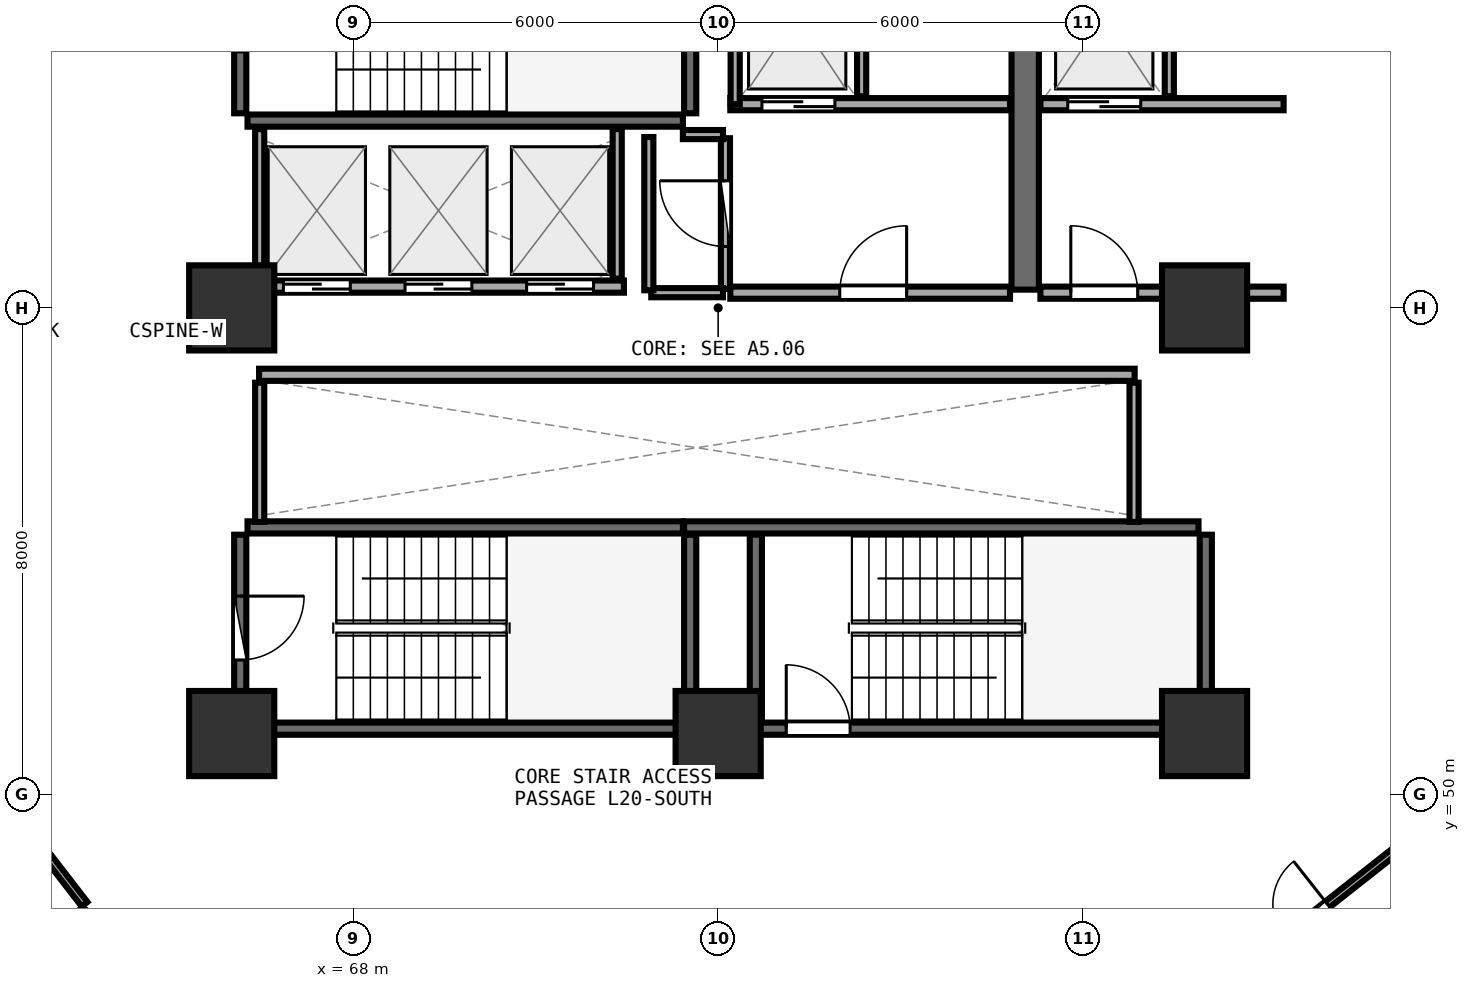
"""IFC4 building model, lengths in metres.
Left out: names, types, materials, properties, quantities, classifications, styles, units other than length and angle.
Written with IfcOpenShell. Run it as: python <this file> out.ifc"""

import sys

from ifc_helpers import new_model, si_unit, direction, frame, frame_2d, origin, origin_2d, place, context, subcontext, project, spatial, rectangle, extrude, element, fill, save


model = new_model("IFC4")
c1 = context("Model", 3, precision=1e-05, world=origin(), true_north=direction((0.0, 1.0)))
c2 = subcontext(c1, "Body", "Model", "MODEL_VIEW")
j1 = project(units=[si_unit("LENGTHUNIT", "METRE"), si_unit("PLANEANGLEUNIT", "RADIAN")], contexts=[c1])
p1 = place(None, origin())
s1 = spatial("IfcSite", under=j1, at=p1, CompositionType="ELEMENT")
p2 = place(p1, origin())
s2 = spatial("IfcBuilding", under=s1, at=p2, CompositionType="ELEMENT")
p3 = place(p2, frame((0.0, 0.0, 80.1)))
s3 = spatial("IfcBuildingStorey", under=s2, at=p3, CompositionType="ELEMENT", Elevation=80.1)
for number, where, z_axis, x_axis in (
    (1, (66.0, 51.0, 0.0), (0.0, 0.0, 1.0), (1.0, 0.0, 0.0)),
    (2, (74.0, 51.0, 0.0), (0.0, 0.0, 1.0), (1.0, 0.0, 0.0)),
    (3, (82.0, 51.0, 0.0), (0.0, 0.0, 1.0), (1.0, 0.0, 0.0)),
    (4, (82.0, 58.0, 0.0), (0.0, 0.0, 1.0), (1.0, 0.0, 0.0)),
    (5, (66.0, 58.0, 0.0), (0.0, 0.0, 1.0), (1.0, 0.0, 0.0)),
):
    element("IfcColumn", number, at=place(p3, frame(where, z_axis=z_axis, x_axis=x_axis)), inside=s3, PredefinedType="PILASTER", context=c2, shape_type="SweptSolid", body=[
        extrude(rectangle(XDim=1.4, YDim=1.4, at=origin_2d()), origin(), (0.0, 0.0, 1.0), 3.75),
    ])
p4 = place(p3, frame((66.26, 61.08, 0.0), z_axis=(0.0, 0.0, 1.0), x_axis=(1.0, 0.0, 0.0)))
e6 = element("IfcWall", 6, at=p4, inside=s3, PredefinedType="SHEAR", context=c2, shape_type="SweptSolid", body=[
    extrude(rectangle(XDim=7.16, YDim=0.2, at=frame_2d((3.58, 0.0))), origin(), (0.0, 0.0, 1.0), 3.49),
])
p5 = place(p3, frame((73.54, 61.2, 0.0), z_axis=(0.0, 0.0, 1.0), x_axis=(0.0, 1.0, 0.0)))
e7 = element("IfcWall", 7, at=p5, inside=s3, PredefinedType="SHEAR", context=c2, shape_type="SweptSolid", body=[
    extrude(rectangle(XDim=3.07, YDim=0.2, at=frame_2d((1.535, 0.0))), origin(), (0.0, 0.0, 1.0), 3.49),
])
p6 = place(p3, frame((66.14, 64.27, 0.0), z_axis=(0.0, 0.0, 1.0), x_axis=(0.0, -1.0, 0.0)))
e8 = element("IfcWall", 8, at=p6, inside=s3, PredefinedType="SHEAR", context=c2, shape_type="SweptSolid", body=[
    extrude(rectangle(XDim=3.07, YDim=0.2, at=frame_2d((1.535, 0.0))), origin(), (0.0, 0.0, 1.0), 3.49),
])
p7 = place(p6, frame((1.01, 0.0, 0.0)))
e9 = element("IfcOpeningElement", 9, at=p7, cuts=e8, PredefinedType="OPENING", context=c2, shape_type="SweptSolid", body=[
    extrude(rectangle(XDim=1.05, YDim=2.1, at=frame_2d((0.525, 1.05))), frame((0.0, 0.11, 0.0), z_axis=(0.0, -1.0, 0.0), x_axis=(1.0, 0.0, 0.0)), (0.0, 0.0, 1.0), 0.22),
])
p8 = place(p3, frame((74.0, 51.08, 0.0), z_axis=(0.0, 0.0, 1.0), x_axis=(1.0, 0.0, 0.0)))
e10 = element("IfcWall", 10, at=p8, inside=s3, PredefinedType="SHEAR", context=c2, shape_type="SweptSolid", body=[
    extrude(rectangle(XDim=7.9, YDim=0.2, at=frame_2d((3.95, 0.0))), origin(), (0.0, 0.0, 1.0), 3.49),
])
p9 = place(p8, frame((1.12, 0.0, 0.0)))
e11 = element("IfcOpeningElement", 11, at=p9, cuts=e10, PredefinedType="OPENING", context=c2, shape_type="SweptSolid", body=[
    extrude(rectangle(XDim=1.05, YDim=2.1, at=frame_2d((0.525, 1.05))), frame((0.0, 0.11, 0.0), z_axis=(0.0, -1.0, 0.0), x_axis=(1.0, 0.0, 0.0)), (0.0, 0.0, 1.0), 0.22),
])
p10 = place(p3, frame((82.02, 51.2, 0.0), z_axis=(0.0, 0.0, 1.0), x_axis=(0.0, 1.0, 0.0)))
e12 = element("IfcWall", 12, at=p10, inside=s3, PredefinedType="SHEAR", context=c2, shape_type="SweptSolid", body=[
    extrude(rectangle(XDim=3.07, YDim=0.2, at=frame_2d((1.535, 0.0))), origin(), (0.0, 0.0, 1.0), 3.49),
])
p11 = place(p3, frame((81.9, 54.39, 0.0), z_axis=(0.0, 0.0, 1.0), x_axis=(-1.0, 0.0, 0.0)))
e13 = element("IfcWall", 13, at=p11, inside=s3, PredefinedType="SHEAR", context=c2, shape_type="SweptSolid", body=[
    extrude(rectangle(XDim=8.46, YDim=0.2, at=frame_2d((4.23, 0.0))), origin(), (0.0, 0.0, 1.0), 3.49),
])
p12 = place(p3, frame((74.62, 54.27, 0.0), z_axis=(0.0, 0.0, 1.0), x_axis=(0.0, -1.0, 0.0)))
e14 = element("IfcWall", 14, at=p12, inside=s3, PredefinedType="SHEAR", context=c2, shape_type="SweptSolid", body=[
    extrude(rectangle(XDim=3.07, YDim=0.2, at=frame_2d((1.535, 0.0))), origin(), (0.0, 0.0, 1.0), 3.49),
])
p13 = place(p3, frame((66.26, 51.08, 0.0), z_axis=(0.0, 0.0, 1.0), x_axis=(1.0, 0.0, 0.0)))
e15 = element("IfcWall", 15, at=p13, inside=s3, PredefinedType="SHEAR", context=c2, shape_type="SweptSolid", body=[
    extrude(rectangle(XDim=7.16, YDim=0.2, at=frame_2d((3.58, 0.0))), origin(), (0.0, 0.0, 1.0), 3.49),
])
p14 = place(p3, frame((73.54, 51.2, 0.0), z_axis=(0.0, 0.0, 1.0), x_axis=(0.0, 1.0, 0.0)))
e16 = element("IfcWall", 16, at=p14, inside=s3, PredefinedType="SHEAR", context=c2, shape_type="SweptSolid", body=[
    extrude(rectangle(XDim=3.07, YDim=0.2, at=frame_2d((1.535, 0.0))), origin(), (0.0, 0.0, 1.0), 3.49),
])
p15 = place(p3, frame((73.42, 54.39, 0.0), z_axis=(0.0, 0.0, 1.0), x_axis=(-1.0, 0.0, 0.0)))
e17 = element("IfcWall", 17, at=p15, inside=s3, PredefinedType="SHEAR", context=c2, shape_type="SweptSolid", body=[
    extrude(rectangle(XDim=7.16, YDim=0.2, at=frame_2d((3.58, 0.0))), origin(), (0.0, 0.0, 1.0), 3.49),
])
p16 = place(p3, frame((66.14, 54.27, 0.0), z_axis=(0.0, 0.0, 1.0), x_axis=(0.0, -1.0, 0.0)))
e18 = element("IfcWall", 18, at=p16, inside=s3, PredefinedType="SHEAR", context=c2, shape_type="SweptSolid", body=[
    extrude(rectangle(XDim=3.07, YDim=0.2, at=frame_2d((1.535, 0.0))), origin(), (0.0, 0.0, 1.0), 3.49),
])
p17 = place(p16, frame((1.01, 0.0, 0.0)))
e19 = element("IfcOpeningElement", 19, at=p17, cuts=e18, PredefinedType="OPENING", context=c2, shape_type="SweptSolid", body=[
    extrude(rectangle(XDim=1.05, YDim=2.1, at=frame_2d((0.525, 1.05))), frame((0.0, 0.11, 0.0), z_axis=(0.0, -1.0, 0.0), x_axis=(1.0, 0.0, 0.0)), (0.0, 0.0, 1.0), 0.22),
])
p18 = place(p3, frame((79.05, 58.3, 0.0), z_axis=(0.0, 0.0, 1.0), x_axis=(0.0, 1.0, 0.0)))
e20 = element("IfcWall", 20, at=p18, inside=s3, PredefinedType="SHEAR", context=c2, shape_type="SweptSolid", body=[
    extrude(rectangle(XDim=6.3, YDim=0.45, at=frame_2d((3.15, 0.0))), origin(), (0.0, 0.0, 1.0), 3.49),
])
p19 = place(p3, frame((74.2, 61.35, 0.0), z_axis=(0.0, 0.0, 1.0), x_axis=(1.0, 0.0, 0.0)))
e21 = element("IfcWall", 21, at=p19, inside=s3, PredefinedType="SOLIDWALL", context=c2, shape_type="SweptSolid", body=[
    extrude(rectangle(XDim=4.6, YDim=0.2, at=frame_2d((2.3, 0.0))), origin(), (0.0, 0.0, 1.0), 3.48),
])
p20 = place(p19, frame((0.52, 0.0, 0.0)))
e22 = element("IfcOpeningElement", 22, at=p20, cuts=e21, PredefinedType="OPENING", context=c2, shape_type="SweptSolid", body=[
    extrude(rectangle(XDim=1.2, YDim=2.15, at=frame_2d((0.6, 1.075))), frame((0.0, 0.11, 0.0), z_axis=(0.0, -1.0, 0.0), x_axis=(1.0, 0.0, 0.0)), (0.0, 0.0, 1.0), 0.22),
])
p21 = place(p3, frame((74.28, 61.35, 0.0), z_axis=(0.0, 0.0, 1.0), x_axis=(0.0, 1.0, 0.0)))
e23 = element("IfcWall", 23, at=p21, inside=s3, PredefinedType="PARTITIONING", context=c2, shape_type="SweptSolid", body=[
    extrude(rectangle(XDim=2.97, YDim=0.15, at=frame_2d((1.485, 0.0))), origin(), (0.0, 0.0, 1.0), 3.48),
])
p22 = place(p3, frame((76.36, 61.48, 0.0), z_axis=(0.0, 0.0, 1.0), x_axis=(0.0, 1.0, 0.0)))
e24 = element("IfcWall", 24, at=p22, inside=s3, PredefinedType="PARTITIONING", context=c2, shape_type="SweptSolid", body=[
    extrude(rectangle(XDim=2.84, YDim=0.15, at=frame_2d((1.42, 0.0))), origin(), (0.0, 0.0, 1.0), 3.48),
])
p23 = place(p3, frame((79.3, 61.35, 0.0), z_axis=(0.0, 0.0, 1.0), x_axis=(1.0, 0.0, 0.0)))
e25 = element("IfcWall", 25, at=p23, inside=s3, PredefinedType="SOLIDWALL", context=c2, shape_type="SweptSolid", body=[
    extrude(rectangle(XDim=4.0, YDim=0.2, at=frame_2d((2.0, 0.0))), origin(), (0.0, 0.0, 1.0), 2.775),
])
p24 = place(p23, frame((0.45, 0.0, 0.0)))
e26 = element("IfcOpeningElement", 26, at=p24, cuts=e25, PredefinedType="OPENING", context=c2, shape_type="SweptSolid", body=[
    extrude(rectangle(XDim=1.2, YDim=2.15, at=frame_2d((0.6, 1.075))), frame((0.0, 0.11, 0.0), z_axis=(0.0, -1.0, 0.0), x_axis=(1.0, 0.0, 0.0)), (0.0, 0.0, 1.0), 0.22),
])
p25 = place(p3, frame((81.42, 61.48, 0.0), z_axis=(0.0, 0.0, 1.0), x_axis=(0.0, 1.0, 0.0)))
e27 = element("IfcWall", 27, at=p25, inside=s3, PredefinedType="PARTITIONING", context=c2, shape_type="SweptSolid", body=[
    extrude(rectangle(XDim=2.84, YDim=0.15, at=frame_2d((1.42, 0.0))), origin(), (0.0, 0.0, 1.0), 3.48),
])
p26 = place(p3, frame((74.2, 58.25, 0.0), z_axis=(0.0, 0.0, 1.0), x_axis=(1.0, 0.0, 0.0)))
e28 = element("IfcWall", 28, at=p26, inside=s3, PredefinedType="SOLIDWALL", context=c2, shape_type="SweptSolid", body=[
    extrude(rectangle(XDim=4.6, YDim=0.2, at=frame_2d((2.3, 0.0))), origin(), (0.0, 0.0, 1.0), 3.48),
])
p27 = place(p26, frame((1.8, 0.0, 0.0)))
e29 = element("IfcOpeningElement", 29, at=p27, cuts=e28, PredefinedType="OPENING", context=c2, shape_type="SweptSolid", body=[
    extrude(rectangle(XDim=1.1, YDim=2.1, at=frame_2d((0.55, 1.05))), frame((0.0, 0.11, 0.0), z_axis=(0.0, -1.0, 0.0), x_axis=(1.0, 0.0, 0.0)), (0.0, 0.0, 1.0), 0.22),
])
p28 = place(p3, frame((79.3, 58.25, 0.0), z_axis=(0.0, 0.0, 1.0), x_axis=(1.0, 0.0, 0.0)))
e30 = element("IfcWall", 30, at=p28, inside=s3, PredefinedType="SOLIDWALL", context=c2, shape_type="SweptSolid", body=[
    extrude(rectangle(XDim=4.0, YDim=0.2, at=frame_2d((2.0, 0.0))), origin(), (0.0, 0.0, 1.0), 2.775),
])
p29 = place(p28, frame((0.5, 0.0, 0.0)))
e31 = element("IfcOpeningElement", 31, at=p29, cuts=e30, PredefinedType="OPENING", context=c2, shape_type="SweptSolid", body=[
    extrude(rectangle(XDim=1.1, YDim=2.1, at=frame_2d((0.55, 1.05))), frame((0.0, 0.11, 0.0), z_axis=(0.0, -1.0, 0.0), x_axis=(1.0, 0.0, 0.0)), (0.0, 0.0, 1.0), 0.22),
])
p30 = place(p3, frame((66.45, 58.35, 0.0), z_axis=(0.0, 0.0, 1.0), x_axis=(1.0, 0.0, 0.0)))
e32 = element("IfcWall", 32, at=p30, inside=s3, PredefinedType="SOLIDWALL", context=c2, shape_type="SweptSolid", body=[
    extrude(rectangle(XDim=6.0, YDim=0.2, at=frame_2d((3.0, 0.0))), origin(), (0.0, 0.0, 1.0), 3.48),
])
p31 = place(p30, frame((0.4, 0.0, 0.0)))
e33 = element("IfcOpeningElement", 33, at=p31, cuts=e32, PredefinedType="OPENING", context=c2, shape_type="SweptSolid", body=[
    extrude(rectangle(XDim=1.1, YDim=2.1, at=frame_2d((0.55, 1.05))), frame((0.0, 0.11, 0.0), z_axis=(0.0, -1.0, 0.0), x_axis=(1.0, 0.0, 0.0)), (0.0, 0.0, 1.0), 0.22),
])
p32 = place(p30, frame((2.4, 0.0, 0.0)))
e34 = element("IfcOpeningElement", 34, at=p32, cuts=e32, PredefinedType="OPENING", context=c2, shape_type="SweptSolid", body=[
    extrude(rectangle(XDim=1.1, YDim=2.1, at=frame_2d((0.55, 1.05))), frame((0.0, 0.11, 0.0), z_axis=(0.0, -1.0, 0.0), x_axis=(1.0, 0.0, 0.0)), (0.0, 0.0, 1.0), 0.22),
])
p33 = place(p30, frame((4.4, 0.0, 0.0)))
e35 = element("IfcOpeningElement", 35, at=p33, cuts=e32, PredefinedType="OPENING", context=c2, shape_type="SweptSolid", body=[
    extrude(rectangle(XDim=1.1, YDim=2.1, at=frame_2d((0.55, 1.05))), frame((0.0, 0.11, 0.0), z_axis=(0.0, -1.0, 0.0), x_axis=(1.0, 0.0, 0.0)), (0.0, 0.0, 1.0), 0.22),
])
for number, where, z_axis, x_axis in (
    (36, (66.46, 58.48, 0.0), (0.0, 0.0, 1.0), (0.0, 1.0, 0.0)),
    (37, (72.34, 58.48, 0.0), (0.0, 0.0, 1.0), (0.0, 1.0, 0.0)),
):
    element("IfcWall", number, at=place(p3, frame(where, z_axis=z_axis, x_axis=x_axis)), inside=s3, PredefinedType="PARTITIONING", context=c2, shape_type="SweptSolid", body=[
        extrude(rectangle(XDim=2.46, YDim=0.15, at=frame_2d((1.23, 0.0))), origin(), (0.0, 0.0, 1.0), 3.48),
    ])
p34 = place(p3, frame((66.45, 56.9, 0.0), z_axis=(0.0, 0.0, 1.0), x_axis=(1.0, 0.0, 0.0)))
e38 = element("IfcWall", 38, at=p34, inside=s3, PredefinedType="SOLIDWALL", context=c2, shape_type="SweptSolid", body=[
    extrude(rectangle(XDim=14.4, YDim=0.2, at=frame_2d((7.2, 0.0))), origin(), (0.0, 0.0, 1.0), 3.48),
])
for number, where, z_axis, x_axis in (
    (39, (66.46, 54.48, 0.0), (0.0, 0.0, 1.0), (0.0, 1.0, 0.0)),
    (40, (80.84, 54.48, 0.0), (0.0, 0.0, 1.0), (0.0, 1.0, 0.0)),
):
    element("IfcWall", number, at=place(p3, frame(where, z_axis=z_axis, x_axis=x_axis)), inside=s3, PredefinedType="PARTITIONING", context=c2, shape_type="SweptSolid", body=[
        extrude(rectangle(XDim=2.29, YDim=0.15, at=frame_2d((1.145, 0.0))), origin(), (0.0, 0.0, 1.0), 3.48),
    ])
p35 = place(p3, frame((74.12, 58.31, 0.0), z_axis=(0.0, 0.0, 1.0), x_axis=(0.0, 1.0, 0.0)))
e41 = element("IfcWall", 41, at=p35, inside=s3, PredefinedType="PARTITIONING", context=c2, shape_type="SweptSolid", body=[
    extrude(rectangle(XDim=2.48, YDim=0.15, at=frame_2d((1.24, 0.0))), origin(), (0.0, 0.0, 1.0), 3.48),
])
p36 = place(p35, frame((0.7, 0.0, 0.0)))
e42 = element("IfcOpeningElement", 42, at=p36, cuts=e41, PredefinedType="OPENING", context=c2, shape_type="SweptSolid", body=[
    extrude(rectangle(XDim=1.08, YDim=2.1, at=frame_2d((0.54, 1.05))), frame((0.0, 0.085, 0.0), z_axis=(0.0, -1.0, 0.0), x_axis=(1.0, 0.0, 0.0)), (0.0, 0.0, 1.0), 0.17),
])
p37 = place(p3, frame((60.275, 52.473, 0.0), z_axis=(0.0, 0.0, 1.0), x_axis=(0.611167326409, -0.791501420801, 0.0)))
e43 = element("IfcWall", 43, at=p37, inside=s3, PredefinedType="PARTITIONING", context=c2, shape_type="SweptSolid", body=[
    extrude(rectangle(XDim=5.407, YDim=0.12, at=frame_2d((2.704, 0.0))), origin(), (0.0, 0.0, 1.0), 2.925),
])
p38 = place(p37, frame((2.254, 0.0, 0.0)))
e44 = element("IfcOpeningElement", 44, at=p38, cuts=e43, PredefinedType="OPENING", context=c2, shape_type="SweptSolid", body=[
    extrude(rectangle(XDim=0.9, YDim=2.08, at=frame_2d((0.45, 1.04))), frame((0.0, 0.07, 0.0), z_axis=(0.0, -1.0, 0.0), x_axis=(1.0, 0.0, 0.0)), (0.0, 0.0, 1.0), 0.14),
])
p39 = place(p3, frame((81.494, 46.198, 0.0), z_axis=(0.0, 0.0, 1.0), x_axis=(0.785315722545, 0.619095482074, 0.0)))
e45 = element("IfcWall", 45, at=p39, inside=s3, PredefinedType="PARTITIONING", context=c2, shape_type="SweptSolid", body=[
    extrude(rectangle(XDim=5.54, YDim=0.12, at=frame_2d((2.77, 0.0))), origin(), (0.0, 0.0, 1.0), 2.925),
])
p40 = place(p39, frame((2.32, 0.0, 0.0)))
e46 = element("IfcOpeningElement", 46, at=p40, cuts=e45, PredefinedType="OPENING", context=c2, shape_type="SweptSolid", body=[
    extrude(rectangle(XDim=0.9, YDim=2.08, at=frame_2d((0.45, 1.04))), frame((0.0, 0.07, 0.0), z_axis=(0.0, -1.0, 0.0), x_axis=(1.0, 0.0, 0.0)), (0.0, 0.0, 1.0), 0.14),
])
p41 = place(p3, frame((72.9, 58.25, 0.0), z_axis=(0.0, 0.0, 1.0), x_axis=(1.0, 0.0, 0.0)))
e47 = element("IfcWall", 47, at=p41, inside=s3, PredefinedType="PARTITIONING", context=c2, shape_type="SweptSolid", body=[
    extrude(rectangle(XDim=1.18, YDim=0.15, at=frame_2d((0.59, 0.0))), origin(), (0.0, 0.0, 1.0), 3.48),
])
p42 = place(p3, frame((74.08, 60.85, 0.0), z_axis=(0.0, 0.0, 1.0), x_axis=(-1.0, 0.0, 0.0)))
e48 = element("IfcWall", 48, at=p42, inside=s3, PredefinedType="PARTITIONING", context=c2, shape_type="SweptSolid", body=[
    extrude(rectangle(XDim=0.66, YDim=0.15, at=frame_2d((0.33, 0.0))), origin(), (0.0, 0.0, 1.0), 3.48),
])
p43 = place(p3, frame((72.86, 60.81, 0.0), z_axis=(0.0, 0.0, 1.0), x_axis=(0.0, -1.0, 0.0)))
e49 = element("IfcWall", 49, at=p43, inside=s3, PredefinedType="PARTITIONING", context=c2, shape_type="SweptSolid", body=[
    extrude(rectangle(XDim=2.52, YDim=0.15, at=frame_2d((1.26, 0.0))), origin(), (0.0, 0.0, 1.0), 3.48),
])
p44 = place(p3, frame((63.587, 48.119, 0.0), z_axis=(0.0, 0.0, 1.0), x_axis=(-0.735387084409, -0.677647279995, 0.0)))
e50 = element("IfcWall", 50, at=p44, inside=s3, PredefinedType="PARTITIONING", context=c2, shape_type="SweptSolid", body=[
    extrude(rectangle(XDim=9.361, YDim=0.1, at=frame_2d((4.681, 0.0))), origin(), (0.0, 0.0, 1.0), 2.975),
])
p45 = place(p9, origin())
e51 = element("IfcDoor", 51, at=p45, inside=s3, OperationType="SINGLE_SWING_LEFT", PredefinedType="DOOR", context=c2, shape_type="SweptSolid", body=[
    extrude(rectangle(XDim=1.05, YDim=2.1, at=frame_2d((0.525, 1.05))), frame((0.0, 0.025, 0.0), z_axis=(0.0, -1.0, 0.0), x_axis=(1.0, 0.0, 0.0)), (0.0, 0.0, 1.0), 0.05),
])
fill(e11, e51)
p46 = place(p17, origin())
e52 = element("IfcDoor", 52, at=p46, inside=s3, OperationType="SINGLE_SWING_LEFT", PredefinedType="DOOR", context=c2, shape_type="SweptSolid", body=[
    extrude(rectangle(XDim=1.05, YDim=2.1, at=frame_2d((0.525, 1.05))), frame((0.0, 0.025, 0.0), z_axis=(0.0, -1.0, 0.0), x_axis=(1.0, 0.0, 0.0)), (0.0, 0.0, 1.0), 0.05),
])
fill(e19, e52)
p47 = place(p20, origin())
e53 = element("IfcDoor", 53, at=p47, inside=s3, OperationType="DOUBLE_DOOR_SLIDING", PredefinedType="DOOR", context=c2, shape_type="SweptSolid", body=[
    extrude(rectangle(XDim=1.2, YDim=2.15, at=frame_2d((0.6, 1.075))), frame((0.0, 0.025, 0.0), z_axis=(0.0, -1.0, 0.0), x_axis=(1.0, 0.0, 0.0)), (0.0, 0.0, 1.0), 0.05),
])
fill(e22, e53)
p48 = place(p24, origin())
e54 = element("IfcDoor", 54, at=p48, inside=s3, OperationType="DOUBLE_DOOR_SLIDING", PredefinedType="DOOR", context=c2, shape_type="SweptSolid", body=[
    extrude(rectangle(XDim=1.2, YDim=2.15, at=frame_2d((0.6, 1.075))), frame((0.0, 0.025, 0.0), z_axis=(0.0, -1.0, 0.0), x_axis=(1.0, 0.0, 0.0)), (0.0, 0.0, 1.0), 0.05),
])
fill(e26, e54)
p49 = place(p27, frame((1.1, 0.0, 0.0), z_axis=(0.0, 0.0, 1.0), x_axis=(-1.0, 0.0, 0.0)))
e55 = element("IfcDoor", 55, at=p49, inside=s3, OperationType="SINGLE_SWING_LEFT", PredefinedType="DOOR", context=c2, shape_type="SweptSolid", body=[
    extrude(rectangle(XDim=1.1, YDim=2.1, at=frame_2d((0.55, 1.05))), frame((0.0, 0.025, 0.0), z_axis=(0.0, -1.0, 0.0), x_axis=(1.0, 0.0, 0.0)), (0.0, 0.0, 1.0), 0.05),
])
fill(e29, e55)
p50 = place(p29, frame((1.1, 0.0, 0.0), z_axis=(0.0, 0.0, 1.0), x_axis=(-1.0, 0.0, 0.0)))
e56 = element("IfcDoor", 56, at=p50, inside=s3, OperationType="SINGLE_SWING_RIGHT", PredefinedType="DOOR", context=c2, shape_type="SweptSolid", body=[
    extrude(rectangle(XDim=1.1, YDim=2.1, at=frame_2d((0.55, 1.05))), frame((0.0, 0.025, 0.0), z_axis=(0.0, -1.0, 0.0), x_axis=(1.0, 0.0, 0.0)), (0.0, 0.0, 1.0), 0.05),
])
fill(e31, e56)
p51 = place(p31, origin())
e57 = element("IfcDoor", 57, at=p51, inside=s3, OperationType="DOUBLE_DOOR_SLIDING", PredefinedType="DOOR", context=c2, shape_type="SweptSolid", body=[
    extrude(rectangle(XDim=1.1, YDim=2.1, at=frame_2d((0.55, 1.05))), frame((0.0, 0.025, 0.0), z_axis=(0.0, -1.0, 0.0), x_axis=(1.0, 0.0, 0.0)), (0.0, 0.0, 1.0), 0.05),
])
fill(e33, e57)
p52 = place(p32, origin())
e58 = element("IfcDoor", 58, at=p52, inside=s3, OperationType="DOUBLE_DOOR_SLIDING", PredefinedType="DOOR", context=c2, shape_type="SweptSolid", body=[
    extrude(rectangle(XDim=1.1, YDim=2.1, at=frame_2d((0.55, 1.05))), frame((0.0, 0.025, 0.0), z_axis=(0.0, -1.0, 0.0), x_axis=(1.0, 0.0, 0.0)), (0.0, 0.0, 1.0), 0.05),
])
fill(e34, e58)
p53 = place(p33, origin())
e59 = element("IfcDoor", 59, at=p53, inside=s3, OperationType="DOUBLE_DOOR_SLIDING", PredefinedType="DOOR", context=c2, shape_type="SweptSolid", body=[
    extrude(rectangle(XDim=1.1, YDim=2.1, at=frame_2d((0.55, 1.05))), frame((0.0, 0.025, 0.0), z_axis=(0.0, -1.0, 0.0), x_axis=(1.0, 0.0, 0.0)), (0.0, 0.0, 1.0), 0.05),
])
fill(e35, e59)
p54 = place(p36, origin())
e60 = element("IfcDoor", 60, at=p54, inside=s3, OperationType="SINGLE_SWING_RIGHT", PredefinedType="DOOR", context=c2, shape_type="SweptSolid", body=[
    extrude(rectangle(XDim=1.08, YDim=2.1, at=frame_2d((0.54, 1.05))), frame((0.0, 0.025, 0.0), z_axis=(0.0, -1.0, 0.0), x_axis=(1.0, 0.0, 0.0)), (0.0, 0.0, 1.0), 0.05),
])
fill(e42, e60)
p55 = place(p40, origin())
e61 = element("IfcDoor", 61, at=p55, inside=s3, OperationType="SINGLE_SWING_RIGHT", PredefinedType="DOOR", context=c2, shape_type="SweptSolid", body=[
    extrude(rectangle(XDim=0.9, YDim=2.08, at=frame_2d((0.45, 1.04))), frame((0.0, 0.025, 0.0), z_axis=(0.0, -1.0, 0.0), x_axis=(1.0, 0.0, 0.0)), (0.0, 0.0, 1.0), 0.05),
])
fill(e46, e61)
save(model, sys.argv[1])
